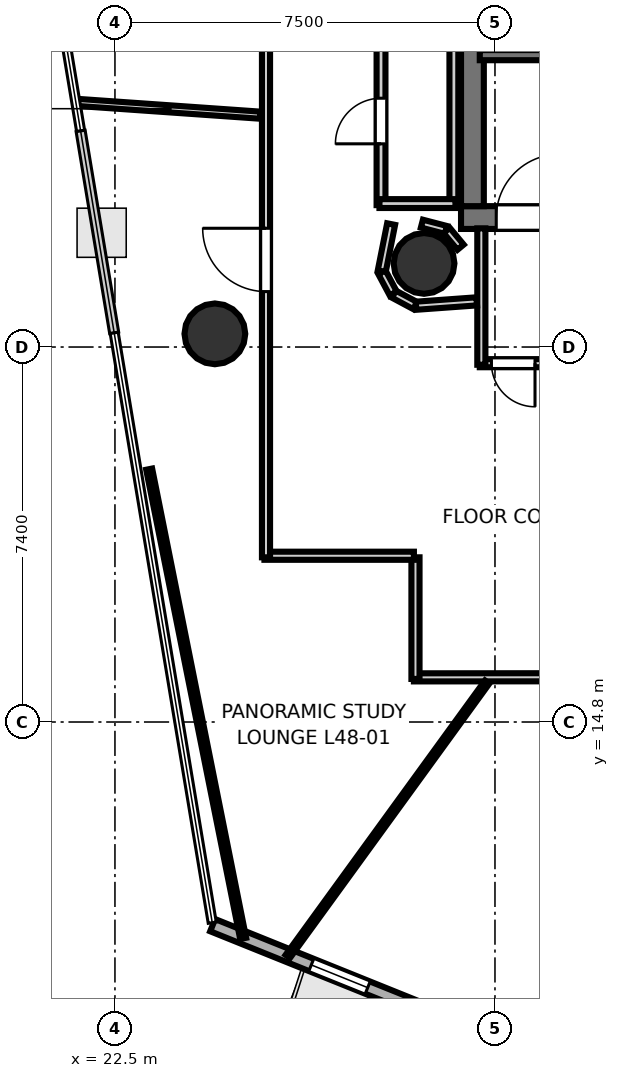
"""IFC4 building model, lengths in metres.
Left out: names, types, materials, properties, quantities, classifications, styles, units other than length and angle.
Written with IfcOpenShell. Run it as: python <this file> out.ifc"""

import sys

from ifc_helpers import new_model, si_unit, direction, frame, frame_2d, origin, origin_2d, place, context, subcontext, project, spatial, rectangle, hollow_circle, extrude, element, fill, save


model = new_model("IFC4")
c1 = context("Model", 3, precision=1e-05, world=origin(), true_north=direction((0.0, 1.0)))
c2 = subcontext(c1, "Body", "Model", "MODEL_VIEW")
j1 = project(units=[si_unit("LENGTHUNIT", "METRE"), si_unit("PLANEANGLEUNIT", "RADIAN")], contexts=[c1])
p1 = place(None, origin())
s1 = spatial("IfcSite", under=j1, at=p1, CompositionType="ELEMENT")
p2 = place(p1, origin())
s2 = spatial("IfcBuilding", under=s1, at=p2, CompositionType="ELEMENT")
p3 = place(p2, frame((0.0, 0.0, 189.2)))
s3 = spatial("IfcBuildingStorey", under=s2, at=p3, CompositionType="ELEMENT", Elevation=189.2)
p4 = place(p3, frame((29.33, 24.755, 0.0), z_axis=(0.0, 0.0, 1.0), x_axis=(1.0, 0.0, 0.0)))
e1 = element("IfcWall", 1, at=p4, inside=s3, PredefinedType="SHEAR", context=c2, shape_type="SweptSolid", body=[
    extrude(rectangle(XDim=10.52, YDim=0.45, at=frame_2d((5.26, 0.0))), origin(), (0.0, 0.0, 1.0), 3.52),
])
p5 = place(p4, frame((0.695, 0.0, 0.0)))
e2 = element("IfcOpeningElement", 2, at=p5, cuts=e1, PredefinedType="OPENING", context=c2, shape_type="SweptSolid", body=[
    extrude(rectangle(XDim=1.25, YDim=2.15, at=frame_2d((0.625, 1.075))), frame((0.0, 0.235, 0.0), z_axis=(0.0, -1.0, 0.0), x_axis=(1.0, 0.0, 0.0)), (0.0, 0.0, 1.0), 0.47),
])
p6 = place(p3, frame((29.555, 24.98, 0.0), z_axis=(0.0, 0.0, 1.0), x_axis=(0.0, 1.0, 0.0)))
e3 = element("IfcWall", 3, at=p6, inside=s3, PredefinedType="SHEAR", context=c2, shape_type="SweptSolid", body=[
    extrude(rectangle(XDim=7.44, YDim=0.45, at=frame_2d((3.72, 0.0))), origin(), (0.0, 0.0, 1.0), 3.52),
])
p7 = place(p3, frame((28.6, 23.85, 0.0), z_axis=(0.0, 0.0, 1.0), x_axis=(1.0, 0.0, 0.0)))
e4 = element("IfcColumn", 4, at=p7, inside=s3, PredefinedType="COLUMN", context=c2, shape_type="SweptSolid", body=[
    extrude(hollow_circle(Radius=0.6, WallThickness=0.03, at=origin_2d()), origin(), (0.0, 0.0, 1.0), 3.7),
])
p8 = place(p3, frame((24.472, 22.46, -0.23), z_axis=(0.0, 0.0, 1.0), x_axis=(1.0, 0.0, 0.0)))
e5 = element("IfcColumn", 5, at=p8, inside=s3, PredefinedType="COLUMN", context=c2, shape_type="SweptSolid", body=[
    extrude(hollow_circle(Radius=0.6, WallThickness=0.03, at=origin_2d()), origin(), (0.0, 0.0, 1.0), 3.93),
])
p9 = place(p3, frame((24.428, 10.791, 0.0), z_axis=(0.0, 0.0, 1.0), x_axis=(0.927535144365, -0.373735944174, 0.0)))
e6 = element("IfcWall", 6, at=p9, inside=s3, PredefinedType="SOLIDWALL", context=c2, shape_type="SweptSolid", body=[
    extrude(rectangle(XDim=7.929, YDim=0.26, at=frame_2d((3.964, 0.0))), origin(), (0.0, 0.0, 1.0), 3.52),
])
p10 = place(p9, frame((2.099, 0.0, 0.9)))
e7 = element("IfcOpeningElement", 7, at=p10, cuts=e6, PredefinedType="OPENING", context=c2, shape_type="SweptSolid", body=[
    extrude(rectangle(XDim=1.2, YDim=2.0, at=frame_2d((0.6, 1.0))), frame((0.0, 0.14, 0.0), z_axis=(0.0, -1.0, 0.0), x_axis=(1.0, 0.0, 0.0)), (0.0, 0.0, 1.0), 0.28),
])
p11 = place(p9, frame((4.95, 0.0, 0.9)))
e8 = element("IfcOpeningElement", 8, at=p11, cuts=e6, PredefinedType="OPENING", context=c2, shape_type="SweptSolid", body=[
    extrude(rectangle(XDim=1.2, YDim=2.0, at=frame_2d((0.6, 1.0))), frame((0.0, 0.14, 0.0), z_axis=(0.0, -1.0, 0.0), x_axis=(1.0, 0.0, 0.0)), (0.0, 0.0, 1.0), 0.28),
])
p12 = place(p3, frame((29.7, 27.96, 0.0), z_axis=(0.0, 0.0, 1.0), x_axis=(1.0, 0.0, 0.0)))
e9 = element("IfcWall", 9, at=p12, inside=s3, PredefinedType="SOLIDWALL", context=c2, shape_type="SweptSolid", body=[
    extrude(rectangle(XDim=7.75, YDim=0.2, at=frame_2d((3.875, 0.0))), origin(), (0.0, 0.0, 1.0), 3.52),
])
p13 = place(p3, frame((33.45, 21.881, 0.0), z_axis=(0.0, 0.0, 1.0), x_axis=(-1.0, 0.0, 0.0)))
e10 = element("IfcWall", 10, at=p13, inside=s3, PredefinedType="PARTITIONING", context=c2, shape_type="SweptSolid", body=[
    extrude(rectangle(XDim=3.75, YDim=0.16, at=frame_2d((1.875, 0.0))), origin(), (0.0, 0.0, 1.0), 2.84),
])
p14 = place(p13, frame((1.275, 0.0, 0.0)))
e11 = element("IfcOpeningElement", 11, at=p14, cuts=e10, PredefinedType="OPENING", context=c2, shape_type="SweptSolid", body=[
    extrude(rectangle(XDim=1.2, YDim=2.15, at=frame_2d((0.6, 1.075))), frame((0.0, 0.09, 0.0), z_axis=(0.0, -1.0, 0.0), x_axis=(1.0, 0.0, 0.0)), (0.0, 0.0, 1.0), 0.18),
])
p15 = place(p13, frame((2.66, 0.0, 0.0)))
e12 = element("IfcOpeningElement", 12, at=p15, cuts=e10, PredefinedType="OPENING", context=c2, shape_type="SweptSolid", body=[
    extrude(rectangle(XDim=0.86, YDim=2.05, at=frame_2d((0.43, 1.025))), frame((0.0, 0.09, 0.0), z_axis=(0.0, -1.0, 0.0), x_axis=(1.0, 0.0, 0.0)), (0.0, 0.0, 1.0), 0.18),
])
p16 = place(p3, frame((29.731, 21.85, 0.0), z_axis=(0.0, 0.0, 1.0), x_axis=(0.0, 1.0, 0.0)))
e13 = element("IfcWall", 13, at=p16, inside=s3, PredefinedType="PARTITIONING", context=c2, shape_type="SweptSolid", body=[
    extrude(rectangle(XDim=2.692, YDim=0.16, at=frame_2d((1.346, 0.0))), origin(), (0.0, 0.0, 1.0), 2.84),
])
p17 = place(p3, frame((27.751, 25.0, 0.0), z_axis=(0.0, 0.0, 1.0), x_axis=(0.0, 1.0, 0.0)))
e14 = element("IfcWall", 14, at=p17, inside=s3, PredefinedType="PLUMBINGWALL", context=c2, shape_type="SweptSolid", body=[
    extrude(rectangle(XDim=3.32, YDim=0.175, at=frame_2d((1.66, 0.0))), origin(), (0.0, 0.0, 1.0), 2.84),
])
p18 = place(p17, frame((1.21, 0.0, 0.0)))
e15 = element("IfcOpeningElement", 15, at=p18, cuts=e14, PredefinedType="OPENING", context=c2, shape_type="SweptSolid", body=[
    extrude(rectangle(XDim=0.9, YDim=2.1, at=frame_2d((0.45, 1.05))), frame((0.0, 0.097, 0.0), z_axis=(0.0, -1.0, 0.0), x_axis=(1.0, 0.0, 0.0)), (0.0, 0.0, 1.0), 0.195),
])
p19 = place(p3, frame((29.189, 28.32, 0.0), z_axis=(0.0, 0.0, 1.0), x_axis=(0.0, -1.0, 0.0)))
e16 = element("IfcWall", 16, at=p19, inside=s3, PredefinedType="PLUMBINGWALL", context=c2, shape_type="SweptSolid", body=[
    extrude(rectangle(XDim=3.32, YDim=0.175, at=frame_2d((1.66, 0.0))), origin(), (0.0, 0.0, 1.0), 2.84),
])
p20 = place(p3, frame((29.22, 25.031, 0.0), z_axis=(0.0, 0.0, 1.0), x_axis=(-1.0, 0.0, 0.0)))
e17 = element("IfcWall", 17, at=p20, inside=s3, PredefinedType="PLUMBINGWALL", context=c2, shape_type="SweptSolid", body=[
    extrude(rectangle(XDim=1.5, YDim=0.175, at=frame_2d((0.75, 0.0))), origin(), (0.0, 0.0, 1.0), 2.84),
])
p21 = place(p3, frame((29.321, 24.17, 0.0), z_axis=(0.0, 0.0, 1.0), x_axis=(-0.638008265708, 0.770029514296, 0.0)))
e18 = element("IfcWall", 18, at=p21, inside=s3, PredefinedType="PARTITIONING", context=c2, shape_type="SweptSolid", body=[
    extrude(rectangle(XDim=0.431, YDim=0.16, at=frame_2d((0.215, 0.0))), origin(), (0.0, 0.0, 1.0), 2.84),
])
p22 = place(p3, frame((29.03, 24.512, 0.0), z_axis=(0.0, 0.0, 1.0), x_axis=(-0.967681003213, 0.252177469296, 0.0)))
e19 = element("IfcWall", 19, at=p22, inside=s3, PredefinedType="PARTITIONING", context=c2, shape_type="SweptSolid", body=[
    extrude(rectangle(XDim=0.488, YDim=0.16, at=frame_2d((0.244, 0.0))), origin(), (0.0, 0.0, 1.0), 2.84),
])
p23 = place(p3, frame((27.95, 24.626, 0.0), z_axis=(0.0, 0.0, 1.0), x_axis=(-0.195125950178, -0.980778192848, 0.0)))
e20 = element("IfcWall", 20, at=p23, inside=s3, PredefinedType="PARTITIONING", context=c2, shape_type="SweptSolid", body=[
    extrude(rectangle(XDim=0.948, YDim=0.16, at=frame_2d((0.474, 0.0))), origin(), (0.0, 0.0, 1.0), 2.84),
])
for number, where, z_axis, x_axis in (
    (21, (27.768, 23.675, 0.0), (0.0, 0.0, 1.0), (0.472, -0.882, 0.0)),
    (22, (28.006, 23.243, 0.0), (0.0, 0.0, 1.0), (0.882, -0.472, 0.0)),
):
    element("IfcWall", number, at=place(p3, frame(where, z_axis=z_axis, x_axis=x_axis)), inside=s3, PredefinedType="PARTITIONING", context=c2, shape_type="SweptSolid", body=[
        extrude(rectangle(XDim=0.476, YDim=0.16, at=frame_2d((0.238, 0.0))), origin(), (0.0, 0.0, 1.0), 2.84),
    ])
p24 = place(p3, frame((28.442, 23.015, 0.0), z_axis=(0.0, 0.0, 1.0), x_axis=(0.99740683837, 0.07196942943, 0.0)))
e23 = element("IfcWall", 23, at=p24, inside=s3, PredefinedType="PARTITIONING", context=c2, shape_type="SweptSolid", body=[
    extrude(rectangle(XDim=1.201, YDim=0.16, at=frame_2d((0.601, 0.0))), origin(), (0.0, 0.0, 1.0), 2.84),
])
p25 = place(p3, frame((43.552, 15.691, 0.0), z_axis=(0.0, 0.0, 1.0), x_axis=(-0.999999781798, -0.00066060826, 0.0)))
e24 = element("IfcWall", 24, at=p25, inside=s3, PredefinedType="PARTITIONING", context=c2, shape_type="SweptSolid", body=[
    extrude(rectangle(XDim=15.152, YDim=0.16, at=frame_2d((7.576, 0.0))), origin(), (0.0, 0.0, 1.0), 2.84),
])
p26 = place(p25, frame((11.356, 0.0, 0.0)))
e25 = element("IfcOpeningElement", 25, at=p26, cuts=e24, PredefinedType="OPENING", context=c2, shape_type="SweptSolid", body=[
    extrude(rectangle(XDim=1.25, YDim=2.2, at=frame_2d((0.625, 1.1))), frame((0.0, 0.09, 0.0), z_axis=(0.0, -1.0, 0.0), x_axis=(1.0, 0.0, 0.0)), (0.0, 0.0, 1.0), 0.18),
])
p27 = place(p25, frame((5.033, 0.0, 0.0)))
e26 = element("IfcOpeningElement", 26, at=p27, cuts=e24, PredefinedType="OPENING", context=c2, shape_type="SweptSolid", body=[
    extrude(rectangle(XDim=1.25, YDim=2.2, at=frame_2d((0.625, 1.1))), frame((0.0, 0.09, 0.0), z_axis=(0.0, -1.0, 0.0), x_axis=(1.0, 0.0, 0.0)), (0.0, 0.0, 1.0), 0.18),
])
p28 = place(p3, frame((28.431, 15.65, 0.0), z_axis=(0.0, 0.0, 1.0), x_axis=(0.0, 1.0, 0.0)))
e27 = element("IfcWall", 27, at=p28, inside=s3, PredefinedType="PARTITIONING", context=c2, shape_type="SweptSolid", body=[
    extrude(rectangle(XDim=2.4, YDim=0.16, at=frame_2d((1.2, 0.0))), origin(), (0.0, 0.0, 1.0), 2.84),
])
p29 = place(p3, frame((28.4, 18.081, 0.0), z_axis=(0.0, 0.0, 1.0), x_axis=(-1.0, 0.0, 0.0)))
e28 = element("IfcWall", 28, at=p29, inside=s3, PredefinedType="PARTITIONING", context=c2, shape_type="SweptSolid", body=[
    extrude(rectangle(XDim=2.95, YDim=0.16, at=frame_2d((1.475, 0.0))), origin(), (0.0, 0.0, 1.0), 2.84),
])
p30 = place(p3, frame((25.481, 18.05, 0.0), z_axis=(0.0, 0.0, 1.0), x_axis=(0.0, 1.0, 0.0)))
e29 = element("IfcWall", 29, at=p30, inside=s3, PredefinedType="PARTITIONING", context=c2, shape_type="SweptSolid", body=[
    extrude(rectangle(XDim=18.219, YDim=0.16, at=frame_2d((9.109, 0.0))), origin(), (0.0, 0.0, 1.0), 2.84),
])
p31 = place(p30, frame((5.244, 0.0, 0.0)))
e30 = element("IfcOpeningElement", 30, at=p31, cuts=e29, PredefinedType="OPENING", context=c2, shape_type="SweptSolid", body=[
    extrude(rectangle(XDim=1.25, YDim=2.2, at=frame_2d((0.625, 1.1))), frame((0.0, 0.09, 0.0), z_axis=(0.0, -1.0, 0.0), x_axis=(1.0, 0.0, 0.0)), (0.0, 0.0, 1.0), 0.18),
])
p32 = place(p30, frame((12.534, 0.0, 0.0)))
e31 = element("IfcOpeningElement", 31, at=p32, cuts=e29, PredefinedType="OPENING", context=c2, shape_type="SweptSolid", body=[
    extrude(rectangle(XDim=1.25, YDim=2.2, at=frame_2d((0.625, 1.1))), frame((0.0, 0.09, 0.0), z_axis=(0.0, -1.0, 0.0), x_axis=(1.0, 0.0, 0.0)), (0.0, 0.0, 1.0), 0.18),
])
p33 = place(p3, frame((21.708, 27.031, 0.0), z_axis=(0.0, 0.0, 1.0), x_axis=(0.997564989829, -0.06974303598, 0.0)))
e32 = element("IfcWall", 32, at=p33, inside=s3, PredefinedType="PARTITIONING", context=c2, shape_type="SweptSolid", body=[
    extrude(rectangle(XDim=3.669, YDim=0.14, at=frame_2d((1.834, 0.0))), origin(), (0.0, 0.0, 1.0), 2.84),
])
p34 = place(p3, frame((29.846, 15.589, 0.0), z_axis=(0.0, 0.0, 1.0), x_axis=(-0.587807387447, -0.809000911781, 0.0)))
e33 = element("IfcWall", 33, at=p34, inside=s3, PredefinedType="PARTITIONING", context=c2, shape_type="SweptSolid", body=[
    extrude(rectangle(XDim=6.695, YDim=0.105, at=frame_2d((3.348, 0.0))), origin(), (0.0, 0.0, 1.0), 2.84),
])
p35 = place(p3, frame((25.03, 10.53, 0.0), z_axis=(0.0, 0.0, 1.0), x_axis=(-0.196384572999, 0.980526949904, 0.0)))
e34 = element("IfcWall", 34, at=p35, inside=s3, PredefinedType="PARTITIONING", context=c2, shape_type="SweptSolid", body=[
    extrude(rectangle(XDim=9.444, YDim=0.12, at=frame_2d((4.722, 0.0))), origin(), (0.0, 0.0, 1.0), 2.84),
])
p36 = place(p5, origin())
e35 = element("IfcDoor", 35, at=p36, inside=s3, OperationType="SINGLE_SWING_RIGHT", PredefinedType="DOOR", context=c2, shape_type="SweptSolid", body=[
    extrude(rectangle(XDim=1.25, YDim=2.15, at=frame_2d((0.625, 1.075))), frame((0.0, 0.025, 0.0), z_axis=(0.0, -1.0, 0.0), x_axis=(1.0, 0.0, 0.0)), (0.0, 0.0, 1.0), 0.05),
])
fill(e2, e35)
p37 = place(p18, origin())
e36 = element("IfcDoor", 36, at=p37, inside=s3, OperationType="SINGLE_SWING_LEFT", PredefinedType="DOOR", context=c2, shape_type="SweptSolid", body=[
    extrude(rectangle(XDim=0.9, YDim=2.1, at=frame_2d((0.45, 1.05))), frame((0.0, 0.025, 0.0), z_axis=(0.0, -1.0, 0.0), x_axis=(1.0, 0.0, 0.0)), (0.0, 0.0, 1.0), 0.05),
])
fill(e15, e36)
p38 = place(p15, origin())
e37 = element("IfcDoor", 37, at=p38, inside=s3, OperationType="SINGLE_SWING_LEFT", PredefinedType="DOOR", context=c2, shape_type="SweptSolid", body=[
    extrude(rectangle(XDim=0.86, YDim=2.05, at=frame_2d((0.43, 1.025))), frame((0.0, 0.025, 0.0), z_axis=(0.0, -1.0, 0.0), x_axis=(1.0, 0.0, 0.0)), (0.0, 0.0, 1.0), 0.05),
])
fill(e12, e37)
p39 = place(p31, origin())
e38 = element("IfcDoor", 38, at=p39, inside=s3, OperationType="SINGLE_SWING_RIGHT", PredefinedType="DOOR", context=c2, shape_type="SweptSolid", body=[
    extrude(rectangle(XDim=1.25, YDim=2.2, at=frame_2d((0.625, 1.1))), frame((0.0, 0.025, 0.0), z_axis=(0.0, -1.0, 0.0), x_axis=(1.0, 0.0, 0.0)), (0.0, 0.0, 1.0), 0.05),
])
fill(e30, e38)
p40 = place(p10, origin())
e39 = element("IfcWindow", 39, at=p40, inside=s3, PartitioningType="SINGLE_PANEL", PredefinedType="WINDOW", context=c2, shape_type="SweptSolid", body=[
    extrude(rectangle(XDim=1.2, YDim=2.0, at=frame_2d((0.6, 1.0))), frame((0.0, 0.03, 0.0), z_axis=(0.0, -1.0, 0.0), x_axis=(1.0, 0.0, 0.0)), (0.0, 0.0, 1.0), 0.06),
])
fill(e7, e39)
save(model, sys.argv[1])
